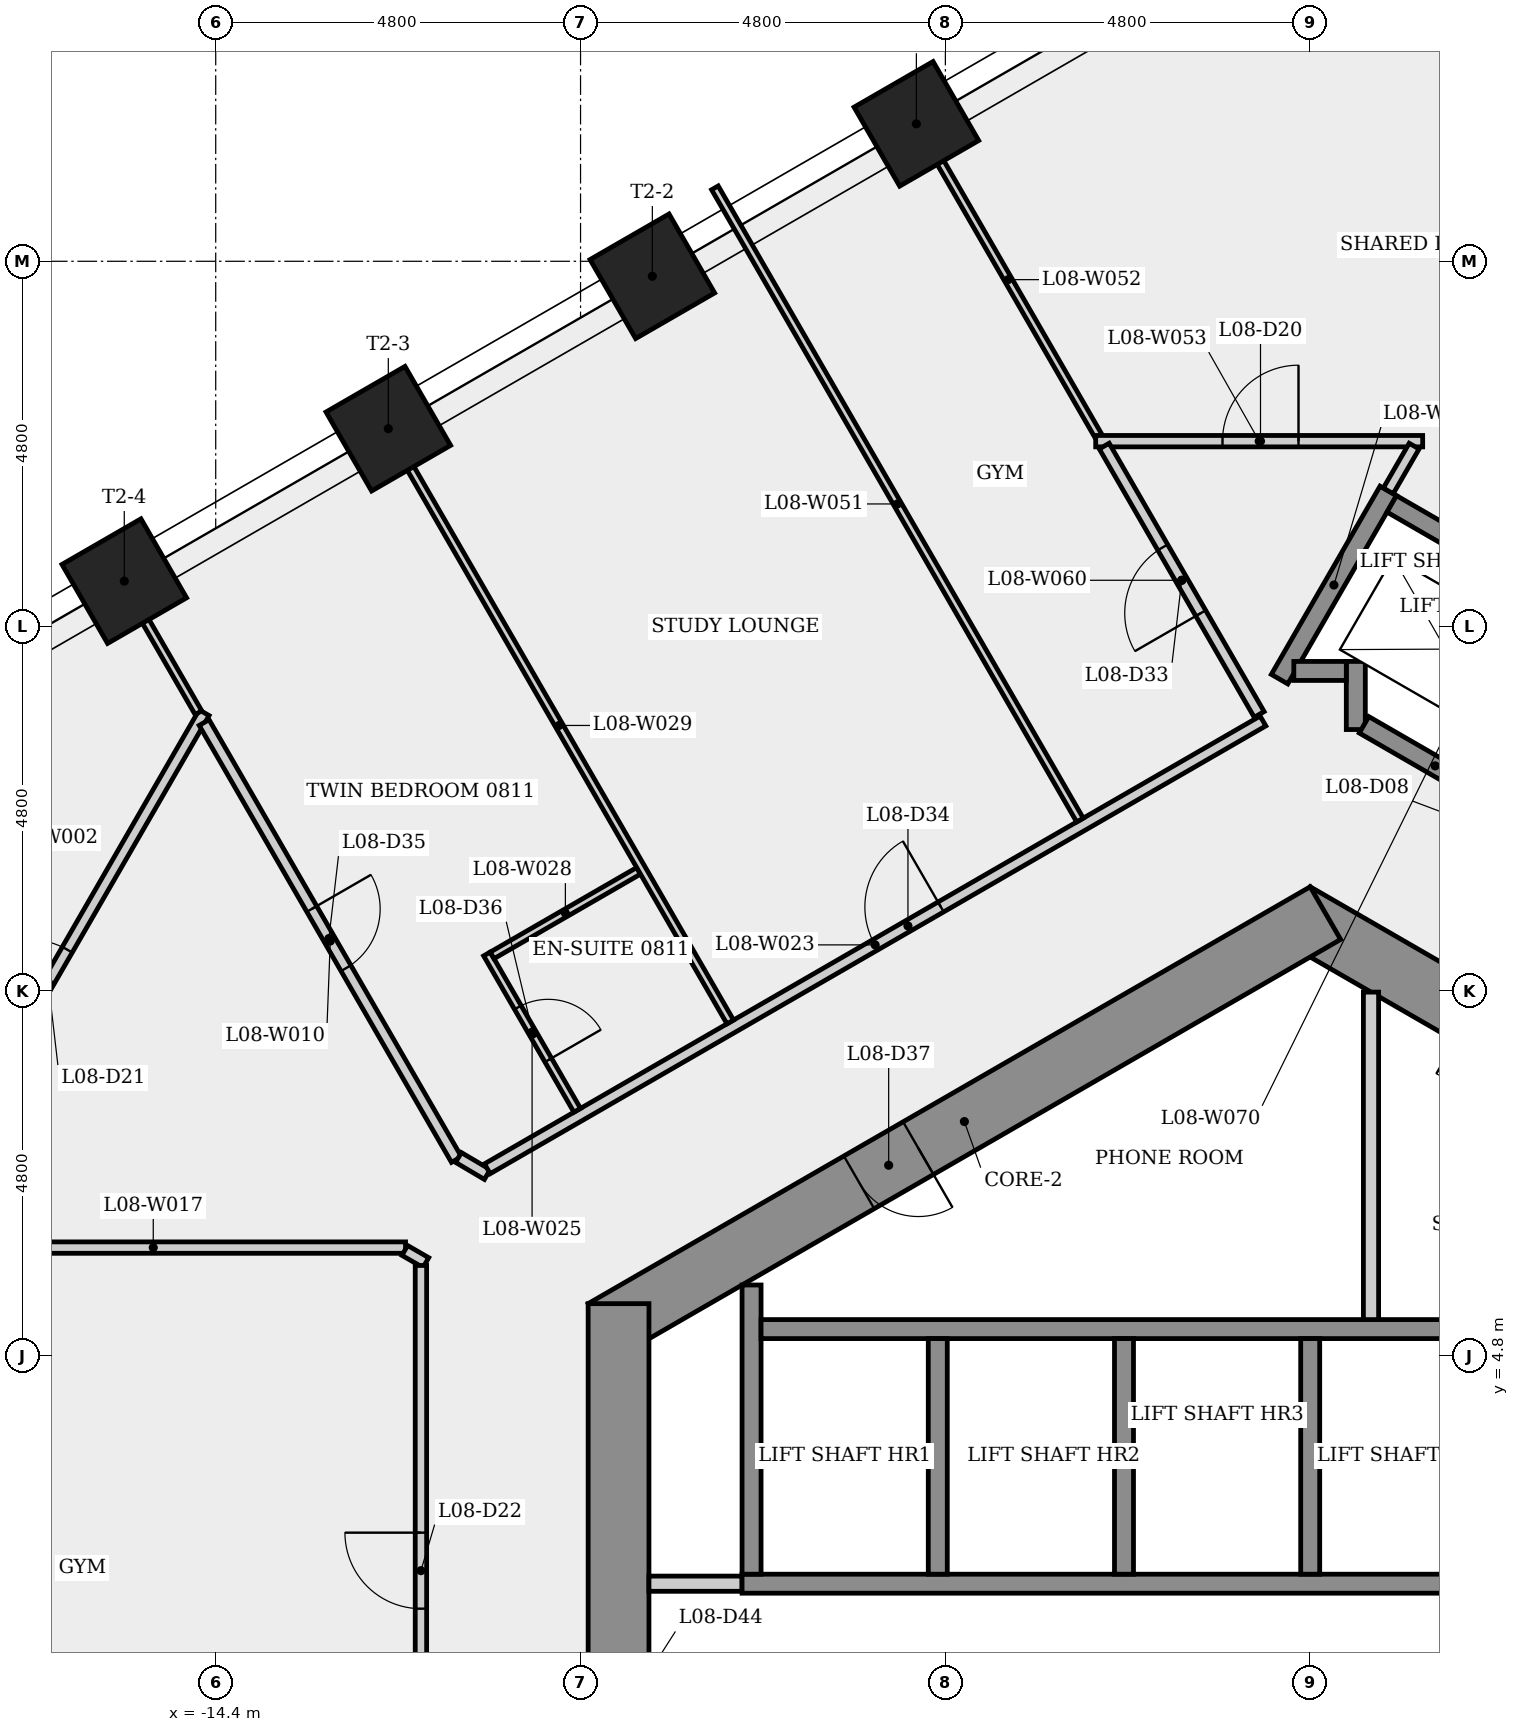
"""IFC4 building model, lengths in metres.
Left out: names, types, materials, properties, quantities, classifications, styles, units other than length and angle.
Written with IfcOpenShell. Run it as: python <this file> out.ifc"""

import sys

from ifc_helpers import new_model, si_unit, direction, frame, frame_2d, origin, origin_2d, place, context, subcontext, project, spatial, rectangle, extrude, element, fill, save


model = new_model("IFC4")
c1 = context("Model", 3, precision=1e-05, world=origin(), true_north=direction((0.0, 1.0)))
c2 = subcontext(c1, "Body", "Model", "MODEL_VIEW")
j1 = project(units=[si_unit("LENGTHUNIT", "METRE"), si_unit("PLANEANGLEUNIT", "RADIAN")], contexts=[c1])
p1 = place(None, origin())
s1 = spatial("IfcSite", under=j1, at=p1, CompositionType="ELEMENT")
p2 = place(p1, origin())
s2 = spatial("IfcBuilding", under=s1, at=p2, CompositionType="ELEMENT")
p3 = place(p2, frame((0.0, 0.0, 35.7)))
s3 = spatial("IfcBuildingStorey", under=s2, at=p3, CompositionType="ELEMENT", Elevation=35.7)
p4 = place(p3, frame((9.3, 5.138, 0.0), z_axis=(0.0, 0.0, 1.0), x_axis=(-0.866023993627, 0.500002442456, 0.0)))
e1 = element("IfcWall", 1, at=p4, inside=s3, PredefinedType="SHEAR", context=c2, shape_type="SweptSolid", body=[
    extrude(rectangle(XDim=10.97, YDim=0.8, at=frame_2d((5.485, 0.0))), origin(), (0.0, 0.0, 1.0), 3.4),
])
p5 = place(p4, frame((7.403, 0.0, 0.0)))
e2 = element("IfcOpeningElement", 2, at=p5, cuts=e1, PredefinedType="OPENING", context=c2, shape_type="SweptSolid", body=[
    extrude(rectangle(XDim=0.9, YDim=2.1, at=frame_2d((0.45, 1.05))), frame((0.0, 0.41, 0.0), z_axis=(0.0, -1.0, 0.0), x_axis=(1.0, 0.0, 0.0)), (0.0, 0.0, 1.0), 0.82),
])
p6 = place(p4, frame((0.78, 0.0, 0.0)))
e3 = element("IfcOpeningElement", 3, at=p6, cuts=e1, PredefinedType="OPENING", context=c2, shape_type="SweptSolid", body=[
    extrude(rectangle(XDim=0.9, YDim=2.1, at=frame_2d((0.45, 1.05))), frame((0.0, 0.41, 0.0), z_axis=(0.0, -1.0, 0.0), x_axis=(1.0, 0.0, 0.0)), (0.0, 0.0, 1.0), 0.82),
])
p7 = place(p3, frame((0.2, 10.623, 0.0), z_axis=(0.0, 0.0, 1.0), x_axis=(-0.866023993627, -0.500002442456, 0.0)))
e4 = element("IfcWall", 4, at=p7, inside=s3, PredefinedType="SHEAR", context=c2, shape_type="SweptSolid", body=[
    extrude(rectangle(XDim=10.97, YDim=0.8, at=frame_2d((5.485, 0.0))), origin(), (0.0, 0.0, 1.0), 3.4),
])
p8 = place(p7, frame((6.185, 0.0, 0.0)))
e5 = element("IfcOpeningElement", 5, at=p8, cuts=e4, PredefinedType="OPENING", context=c2, shape_type="SweptSolid", body=[
    extrude(rectangle(XDim=0.9, YDim=2.1, at=frame_2d((0.45, 1.05))), frame((0.0, 0.41, 0.0), z_axis=(0.0, -1.0, 0.0), x_axis=(1.0, 0.0, 0.0)), (0.0, 0.0, 1.0), 0.82),
])
p9 = place(p3, frame((-9.1, 5.485, 0.0), z_axis=(0.0, 0.0, 1.0), x_axis=(0.0, -1.0, 0.0)))
e6 = element("IfcWall", 6, at=p9, inside=s3, PredefinedType="SHEAR", context=c2, shape_type="SweptSolid", body=[
    extrude(rectangle(XDim=10.97, YDim=0.8, at=frame_2d((5.485, 0.0))), origin(), (0.0, 0.0, 1.0), 3.4),
])
p10 = place(p9, frame((4.685, 0.0, 0.0)))
e7 = element("IfcOpeningElement", 7, at=p10, cuts=e6, PredefinedType="OPENING", context=c2, shape_type="SweptSolid", body=[
    extrude(rectangle(XDim=1.6, YDim=2.1, at=frame_2d((0.8, 1.05))), frame((0.0, 0.41, 0.0), z_axis=(0.0, -1.0, 0.0), x_axis=(1.0, 0.0, 0.0)), (0.0, 0.0, 1.0), 0.82),
])
for number, where, z_axis, x_axis in (
    (8, (-5.182, 21.009, 0.0), (0.0, 0.0, 1.0), (-0.5, 0.866, 0.0)),
    (9, (-8.655, 19.003, 0.0), (0.0, 0.0, 1.0), (-0.5, 0.866, 0.0)),
    (10, (-12.129, 16.997, 0.0), (0.0, 0.0, 1.0), (-0.5, 0.866, 0.0)),
    (11, (-15.603, 14.991, 0.0), (0.0, 0.0, 1.0), (-0.5, 0.866, 0.0)),
):
    element("IfcColumn", number, at=place(p3, frame(where, z_axis=z_axis, x_axis=x_axis)), inside=s3, PredefinedType="COLUMN", context=c2, shape_type="SweptSolid", body=[
        extrude(rectangle(XDim=1.2, YDim=1.2, at=origin_2d()), origin(), (0.0, 0.0, 1.0), 3.4),
    ])
p11 = place(p3, frame((-18.653, 6.157, 0.0), z_axis=(0.0, 0.0, 1.0), x_axis=(0.499990428537, 0.866030929801, 0.0)))
e12 = element("IfcWall", 12, at=p11, inside=s3, PredefinedType="PARTITIONING", context=c2, shape_type="SweptSolid", body=[
    extrude(rectangle(XDim=8.202, YDim=0.15, at=frame_2d((4.101, 0.0))), origin(), (0.0, 0.0, 1.0), 3.05),
])
p12 = place(p11, frame((3.601, 0.0, 0.0)))
e13 = element("IfcOpeningElement", 13, at=p12, cuts=e12, PredefinedType="OPENING", context=c2, shape_type="SweptSolid", body=[
    extrude(rectangle(XDim=1.0, YDim=2.1, at=frame_2d((0.5, 1.05))), frame((0.0, 0.085, 0.0), z_axis=(0.0, -1.0, 0.0), x_axis=(1.0, 0.0, 0.0)), (0.0, 0.0, 1.0), 0.17),
])
p13 = place(p3, frame((-15.621, 14.981, 0.0), z_axis=(0.0, 0.0, 1.0), x_axis=(0.499984821847, -0.866034166718, 0.0)))
e14 = element("IfcWall", 14, at=p13, inside=s3, PredefinedType="PARTITIONING", context=c2, shape_type="SweptSolid", body=[
    extrude(rectangle(XDim=1.987, YDim=0.1, at=frame_2d((0.993, 0.0))), origin(), (0.0, 0.0, 1.0), 3.05),
])
p14 = place(p3, frame((-14.552, 13.131, 0.0), z_axis=(0.0, 0.0, 1.0), x_axis=(0.500011064058, -0.866019015853, 0.0)))
e15 = element("IfcWall", 15, at=p14, inside=s3, PredefinedType="PARTITIONING", context=c2, shape_type="SweptSolid", body=[
    extrude(rectangle(XDim=6.639, YDim=0.15, at=frame_2d((3.319, 0.0))), origin(), (0.0, 0.0, 1.0), 3.05),
])
p15 = place(p14, frame((2.832, 0.0, 0.0)))
e16 = element("IfcOpeningElement", 16, at=p15, cuts=e15, PredefinedType="OPENING", context=c2, shape_type="SweptSolid", body=[
    extrude(rectangle(XDim=0.9, YDim=2.1, at=frame_2d((0.45, 1.05))), frame((0.0, 0.085, 0.0), z_axis=(0.0, -1.0, 0.0), x_axis=(1.0, 0.0, 0.0)), (0.0, 0.0, 1.0), 0.17),
])
p16 = place(p3, frame((-11.903, 6.222, 0.0), z_axis=(0.0, 0.0, 1.0), x_axis=(-1.0, 0.0, 0.0)))
e17 = element("IfcWall", 17, at=p16, inside=s3, PredefinedType="PARTITIONING", context=c2, shape_type="SweptSolid", body=[
    extrude(rectangle(XDim=6.638, YDim=0.15, at=frame_2d((3.319, 0.0))), origin(), (0.0, 0.0, 1.0), 3.05),
])
p17 = place(p3, frame((-11.635, 6.025, 0.0), z_axis=(0.0, 0.0, 1.0), x_axis=(-0.866172903102, 0.499744436618, 0.0)))
e18 = element("IfcWall", 18, at=p17, inside=s3, PredefinedType="PARTITIONING", context=c2, shape_type="SweptSolid", body=[
    extrude(rectangle(XDim=0.321, YDim=0.15, at=frame_2d((0.16, 0.0))), origin(), (0.0, 0.0, 1.0), 3.05),
])
p18 = place(p3, frame((-11.7, -5.987, 0.0), z_axis=(0.0, 0.0, 1.0), x_axis=(0.0, 1.0, 0.0)))
e19 = element("IfcWall", 19, at=p18, inside=s3, PredefinedType="PARTITIONING", context=c2, shape_type="SweptSolid", body=[
    extrude(rectangle(XDim=11.975, YDim=0.15, at=frame_2d((5.987, 0.0))), origin(), (0.0, 0.0, 1.0), 3.05),
])
p19 = place(p18, frame((7.459, 0.0, 0.0)))
e20 = element("IfcOpeningElement", 20, at=p19, cuts=e19, PredefinedType="OPENING", context=c2, shape_type="SweptSolid", body=[
    extrude(rectangle(XDim=1.0, YDim=2.1, at=frame_2d((0.5, 1.05))), frame((0.0, 0.085, 0.0), z_axis=(0.0, -1.0, 0.0), x_axis=(1.0, 0.0, 0.0)), (0.0, 0.0, 1.0), 0.17),
])
p20 = place(p3, frame((-11.206, 7.408, 0.0), z_axis=(0.0, 0.0, 1.0), x_axis=(0.860849270889, -0.508860032631, 0.0)))
e21 = element("IfcWall", 21, at=p20, inside=s3, PredefinedType="PARTITIONING", context=c2, shape_type="SweptSolid", body=[
    extrude(rectangle(XDim=0.44, YDim=0.15, at=frame_2d((0.22, 0.0))), origin(), (0.0, 0.0, 1.0), 3.05),
])
p21 = place(p3, frame((-10.826, 7.26, 0.0), z_axis=(0.0, 0.0, 1.0), x_axis=(0.866022388473, 0.500005222637, 0.0)))
e22 = element("IfcWall", 22, at=p21, inside=s3, PredefinedType="PARTITIONING", context=c2, shape_type="SweptSolid", body=[
    extrude(rectangle(XDim=11.783, YDim=0.15, at=frame_2d((5.892, 0.0))), origin(), (0.0, 0.0, 1.0), 3.05),
])
p22 = place(p21, frame((5.89, 0.0, 0.0)))
e23 = element("IfcOpeningElement", 23, at=p22, cuts=e22, PredefinedType="OPENING", context=c2, shape_type="SweptSolid", body=[
    extrude(rectangle(XDim=1.0, YDim=2.1, at=frame_2d((0.5, 1.05))), frame((0.0, 0.085, 0.0), z_axis=(0.0, -1.0, 0.0), x_axis=(1.0, 0.0, 0.0)), (0.0, 0.0, 1.0), 0.17),
])
p23 = place(p3, frame((-10.831, 10.086, 0.0), z_axis=(0.0, 0.0, 1.0), x_axis=(0.499986429846, -0.866033238375, 0.0)))
e24 = element("IfcWall", 24, at=p23, inside=s3, PredefinedType="PARTITIONING", context=c2, shape_type="SweptSolid", body=[
    extrude(rectangle(XDim=2.375, YDim=0.1, at=frame_2d((1.188, 0.0))), origin(), (0.0, 0.0, 1.0), 3.05),
])
p24 = place(p23, frame((0.812, 0.0, 0.0)))
e25 = element("IfcOpeningElement", 25, at=p24, cuts=e24, PredefinedType="OPENING", context=c2, shape_type="SweptSolid", body=[
    extrude(rectangle(XDim=0.8, YDim=2.1, at=frame_2d((0.4, 1.05))), frame((0.0, 0.06, 0.0), z_axis=(0.0, -1.0, 0.0), x_axis=(1.0, 0.0, 0.0)), (0.0, 0.0, 1.0), 0.12),
])
p25 = place(p3, frame((-8.836, 11.18, 0.0), z_axis=(0.0, 0.0, 1.0), x_axis=(-0.865999189711, -0.500045401358, 0.0)))
e26 = element("IfcWall", 26, at=p25, inside=s3, PredefinedType="PARTITIONING", context=c2, shape_type="SweptSolid", body=[
    extrude(rectangle(XDim=2.225, YDim=0.1, at=frame_2d((1.112, 0.0))), origin(), (0.0, 0.0, 1.0), 3.05),
])
p26 = place(p3, frame((-12.135, 16.994, 0.0), z_axis=(0.0, 0.0, 1.0), x_axis=(0.499997670926, -0.866026748472, 0.0)))
e27 = element("IfcWall", 27, at=p26, inside=s3, PredefinedType="PARTITIONING", context=c2, shape_type="SweptSolid", body=[
    extrude(rectangle(XDim=9.01, YDim=0.1, at=frame_2d((4.505, 0.0))), origin(), (0.0, 0.0, 1.0), 3.05),
])
p27 = place(p3, frame((-8.7, 1.8, 0.0), z_axis=(0.0, 0.0, 1.0), x_axis=(1.0, 0.0, 0.0)))
e28 = element("IfcWall", 28, at=p27, inside=s3, PredefinedType="PARTITIONING", context=c2, shape_type="SweptSolid", body=[
    extrude(rectangle(XDim=1.225, YDim=0.2, at=frame_2d((0.613, 0.0))), origin(), (0.0, 0.0, 1.0), 3.05),
])
p28 = place(p3, frame((-7.475, 1.8, 0.0), z_axis=(0.0, 0.0, 1.0), x_axis=(1.0, 0.0, 0.0)))
e29 = element("IfcWall", 29, at=p28, inside=s3, PredefinedType="SHEAR", context=c2, shape_type="SweptSolid", body=[
    extrude(rectangle(XDim=14.95, YDim=0.25, at=frame_2d((7.475, 0.0))), origin(), (0.0, 0.0, 1.0), 3.05),
])
p29 = place(p3, frame((-7.35, 1.925, 0.0), z_axis=(0.0, 0.0, 1.0), x_axis=(0.0, 1.0, 0.0)))
e30 = element("IfcWall", 30, at=p29, inside=s3, PredefinedType="SHEAR", context=c2, shape_type="SweptSolid", body=[
    extrude(rectangle(XDim=3.805, YDim=0.25, at=frame_2d((1.903, 0.0))), origin(), (0.0, 0.0, 1.0), 3.05),
])
p30 = place(p3, frame((-7.225, 5.15, 0.0), z_axis=(0.0, 0.0, 1.0), x_axis=(1.0, 0.0, 0.0)))
e31 = element("IfcWall", 31, at=p30, inside=s3, PredefinedType="SHEAR", context=c2, shape_type="SweptSolid", body=[
    extrude(rectangle(XDim=14.7, YDim=0.25, at=frame_2d((7.35, 0.0))), origin(), (0.0, 0.0, 1.0), 3.05),
])
p31 = place(p3, frame((-4.9, 5.025, 0.0), z_axis=(0.0, 0.0, 1.0), x_axis=(0.0, -1.0, 0.0)))
e32 = element("IfcWall", 32, at=p31, inside=s3, PredefinedType="SHEAR", context=c2, shape_type="SweptSolid", body=[
    extrude(rectangle(XDim=3.1, YDim=0.25, at=frame_2d((1.55, 0.0))), origin(), (0.0, 0.0, 1.0), 3.4),
])
p32 = place(p3, frame((-3.029, 11.848, 0.0), z_axis=(0.0, 0.0, 1.0), x_axis=(-0.49998793222, 0.866032371008, 0.0)))
e33 = element("IfcWall", 33, at=p32, inside=s3, PredefinedType="PARTITIONING", context=c2, shape_type="SweptSolid", body=[
    extrude(rectangle(XDim=9.606, YDim=0.1, at=frame_2d((4.803, 0.0))), origin(), (0.0, 0.0, 1.0), 3.05),
])
p33 = place(p3, frame((-2.785, 16.898, 0.0), z_axis=(0.0, 0.0, 1.0), x_axis=(-0.500018554574, 0.866014691031, 0.0)))
e34 = element("IfcWall", 34, at=p33, inside=s3, PredefinedType="PARTITIONING", context=c2, shape_type="SweptSolid", body=[
    extrude(rectangle(XDim=4.758, YDim=0.1, at=frame_2d((2.379, 0.0))), origin(), (0.0, 0.0, 1.0), 3.05),
])
p34 = place(p3, frame((-2.822, 16.833, 0.0), z_axis=(0.0, 0.0, 1.0), x_axis=(1.0, 0.0, 0.0)))
e35 = element("IfcWall", 35, at=p34, inside=s3, PredefinedType="PARTITIONING", context=c2, shape_type="SweptSolid", body=[
    extrude(rectangle(XDim=4.302, YDim=0.15, at=frame_2d((2.151, 0.0))), origin(), (0.0, 0.0, 1.0), 3.05),
])
p35 = place(p34, frame((1.668, 0.0, 0.0)))
e36 = element("IfcOpeningElement", 36, at=p35, cuts=e35, PredefinedType="OPENING", context=c2, shape_type="SweptSolid", body=[
    extrude(rectangle(XDim=1.0, YDim=2.1, at=frame_2d((0.5, 1.05))), frame((0.0, 0.085, 0.0), z_axis=(0.0, -1.0, 0.0), x_axis=(1.0, 0.0, 0.0)), (0.0, 0.0, 1.0), 0.17),
])
p36 = place(p3, frame((-2.45, 5.025, 0.0), z_axis=(0.0, 0.0, 1.0), x_axis=(0.0, -1.0, 0.0)))
e37 = element("IfcWall", 37, at=p36, inside=s3, PredefinedType="SHEAR", context=c2, shape_type="SweptSolid", body=[
    extrude(rectangle(XDim=3.1, YDim=0.25, at=frame_2d((1.55, 0.0))), origin(), (0.0, 0.0, 1.0), 3.4),
])
p37 = place(p3, frame((-0.671, 13.237, 0.0), z_axis=(0.0, 0.0, 1.0), x_axis=(-0.499990257196, 0.866031028722, 0.0)))
e38 = element("IfcWall", 38, at=p37, inside=s3, PredefinedType="PARTITIONING", context=c2, shape_type="SweptSolid", body=[
    extrude(rectangle(XDim=4.077, YDim=0.15, at=frame_2d((2.039, 0.0))), origin(), (0.0, 0.0, 1.0), 3.05),
])
p38 = place(p37, frame((1.539, 0.0, 0.0)))
e39 = element("IfcOpeningElement", 39, at=p38, cuts=e38, PredefinedType="OPENING", context=c2, shape_type="SweptSolid", body=[
    extrude(rectangle(XDim=1.0, YDim=2.1, at=frame_2d((0.5, 1.05))), frame((0.0, 0.085, 0.0), z_axis=(0.0, -1.0, 0.0), x_axis=(1.0, 0.0, 0.0)), (0.0, 0.0, 1.0), 0.17),
])
p39 = place(p3, frame((-0.403, 13.702, 0.0), z_axis=(0.0, 0.0, 1.0), x_axis=(0.499976111731, 0.866039195244, 0.0)))
e40 = element("IfcWall", 40, at=p39, inside=s3, PredefinedType="SHEAR", context=c2, shape_type="SweptSolid", body=[
    extrude(rectangle(XDim=2.861, YDim=0.25, at=frame_2d((1.43, 0.0))), origin(), (0.0, 0.0, 1.0), 3.05),
])
p40 = place(p3, frame((0.0, 5.025, 0.0), z_axis=(0.0, 0.0, 1.0), x_axis=(0.0, -1.0, 0.0)))
e41 = element("IfcWall", 41, at=p40, inside=s3, PredefinedType="SHEAR", context=c2, shape_type="SweptSolid", body=[
    extrude(rectangle(XDim=3.1, YDim=0.25, at=frame_2d((1.55, 0.0))), origin(), (0.0, 0.0, 1.0), 3.4),
])
p41 = place(p3, frame((0.6, 13.039, 0.0), z_axis=(0.0, 0.0, 1.0), x_axis=(0.0, 1.0, 0.0)))
e42 = element("IfcWall", 42, at=p41, inside=s3, PredefinedType="SHEAR", context=c2, shape_type="SweptSolid", body=[
    extrude(rectangle(XDim=0.896, YDim=0.25, at=frame_2d((0.448, 0.0))), origin(), (0.0, 0.0, 1.0), 3.05),
])
p42 = place(p3, frame((0.475, 13.81, 0.0), z_axis=(0.0, 0.0, 1.0), x_axis=(-1.0, 0.0, 0.0)))
e43 = element("IfcWall", 43, at=p42, inside=s3, PredefinedType="SHEAR", context=c2, shape_type="SweptSolid", body=[
    extrude(rectangle(XDim=0.691, YDim=0.25, at=frame_2d((0.345, 0.0))), origin(), (0.0, 0.0, 1.0), 3.4),
])
p43 = place(p3, frame((0.8, 9.584, 0.0), z_axis=(0.0, 0.0, 1.0), x_axis=(0.0, -1.0, 0.0)))
e44 = element("IfcWall", 44, at=p43, inside=s3, PredefinedType="PARTITIONING", context=c2, shape_type="SweptSolid", body=[
    extrude(rectangle(XDim=4.309, YDim=0.2, at=frame_2d((2.155, 0.0))), origin(), (0.0, 0.0, 1.0), 3.05),
])
p44 = place(p3, frame((1.073, 16.008, 0.0), z_axis=(0.0, 0.0, 1.0), x_axis=(0.866040211805, -0.499974350878, 0.0)))
e45 = element("IfcWall", 45, at=p44, inside=s3, PredefinedType="SHEAR", context=c2, shape_type="SweptSolid", body=[
    extrude(rectangle(XDim=3.3, YDim=0.25, at=frame_2d((1.65, 0.0))), origin(), (0.0, 0.0, 1.0), 3.05),
])
p45 = place(p3, frame((1.367, 16.768, 0.0), z_axis=(0.0, 0.0, 1.0), x_axis=(-0.499805281321, -0.866137795483, 0.0)))
e46 = element("IfcWall", 46, at=p45, inside=s3, PredefinedType="PARTITIONING", context=c2, shape_type="SweptSolid", body=[
    extrude(rectangle(XDim=0.68, YDim=0.15, at=frame_2d((0.34, 0.0))), origin(), (0.0, 0.0, 1.0), 3.05),
])
p46 = place(p3, frame((2.581, 12.02, 0.0), z_axis=(0.0, 0.0, 1.0), x_axis=(-0.86603892542, 0.499976579108, 0.0)))
e47 = element("IfcWall", 47, at=p46, inside=s3, PredefinedType="SHEAR", context=c2, shape_type="SweptSolid", body=[
    extrude(rectangle(XDim=2.162, YDim=0.25, at=frame_2d((1.081, 0.0))), origin(), (0.0, 0.0, 1.0), 3.05),
])
p47 = place(p35, origin())
e48 = element("IfcDoor", 48, at=p47, inside=s3, OperationType="SINGLE_SWING_RIGHT", PredefinedType="DOOR", context=c2, shape_type="SweptSolid", body=[
    extrude(rectangle(XDim=1.0, YDim=2.1, at=frame_2d((0.5, 1.05))), frame((0.0, 0.025, 0.0), z_axis=(0.0, -1.0, 0.0), x_axis=(1.0, 0.0, 0.0)), (0.0, 0.0, 1.0), 0.05),
])
fill(e36, e48)
p48 = place(p12, origin())
e49 = element("IfcDoor", 49, at=p48, inside=s3, OperationType="SINGLE_SWING_LEFT", PredefinedType="DOOR", context=c2, shape_type="SweptSolid", body=[
    extrude(rectangle(XDim=1.0, YDim=2.1, at=frame_2d((0.5, 1.05))), frame((0.0, 0.025, 0.0), z_axis=(0.0, -1.0, 0.0), x_axis=(1.0, 0.0, 0.0)), (0.0, 0.0, 1.0), 0.05),
])
fill(e13, e49)
p49 = place(p19, origin())
e50 = element("IfcDoor", 50, at=p49, inside=s3, OperationType="SINGLE_SWING_RIGHT", PredefinedType="DOOR", context=c2, shape_type="SweptSolid", body=[
    extrude(rectangle(XDim=1.0, YDim=2.1, at=frame_2d((0.5, 1.05))), frame((0.0, 0.025, 0.0), z_axis=(0.0, -1.0, 0.0), x_axis=(1.0, 0.0, 0.0)), (0.0, 0.0, 1.0), 0.05),
])
fill(e20, e50)
p50 = place(p38, origin())
e51 = element("IfcDoor", 51, at=p50, inside=s3, OperationType="SINGLE_SWING_LEFT", PredefinedType="DOOR", context=c2, shape_type="SweptSolid", body=[
    extrude(rectangle(XDim=1.0, YDim=2.1, at=frame_2d((0.5, 1.05))), frame((0.0, 0.025, 0.0), z_axis=(0.0, -1.0, 0.0), x_axis=(1.0, 0.0, 0.0)), (0.0, 0.0, 1.0), 0.05),
])
fill(e39, e51)
p51 = place(p22, origin())
e52 = element("IfcDoor", 52, at=p51, inside=s3, OperationType="SINGLE_SWING_RIGHT", PredefinedType="DOOR", context=c2, shape_type="SweptSolid", body=[
    extrude(rectangle(XDim=1.0, YDim=2.1, at=frame_2d((0.5, 1.05))), frame((0.0, 0.025, 0.0), z_axis=(0.0, -1.0, 0.0), x_axis=(1.0, 0.0, 0.0)), (0.0, 0.0, 1.0), 0.05),
])
fill(e23, e52)
p52 = place(p15, origin())
e53 = element("IfcDoor", 53, at=p52, inside=s3, OperationType="SINGLE_SWING_LEFT", PredefinedType="DOOR", context=c2, shape_type="SweptSolid", body=[
    extrude(rectangle(XDim=0.9, YDim=2.1, at=frame_2d((0.45, 1.05))), frame((0.0, 0.025, 0.0), z_axis=(0.0, -1.0, 0.0), x_axis=(1.0, 0.0, 0.0)), (0.0, 0.0, 1.0), 0.05),
])
fill(e16, e53)
p53 = place(p24, origin())
e54 = element("IfcDoor", 54, at=p53, inside=s3, OperationType="SINGLE_SWING_RIGHT", PredefinedType="DOOR", context=c2, shape_type="SweptSolid", body=[
    extrude(rectangle(XDim=0.8, YDim=2.1, at=frame_2d((0.4, 1.05))), frame((0.0, 0.025, 0.0), z_axis=(0.0, -1.0, 0.0), x_axis=(1.0, 0.0, 0.0)), (0.0, 0.0, 1.0), 0.05),
])
fill(e25, e54)
p54 = place(p8, origin())
e55 = element("IfcDoor", 55, at=p54, inside=s3, OperationType="SINGLE_SWING_LEFT", PredefinedType="DOOR", context=c2, shape_type="SweptSolid", body=[
    extrude(rectangle(XDim=0.9, YDim=2.1, at=frame_2d((0.45, 1.05))), frame((0.0, 0.025, 0.0), z_axis=(0.0, -1.0, 0.0), x_axis=(1.0, 0.0, 0.0)), (0.0, 0.0, 1.0), 0.05),
])
fill(e5, e55)
save(model, sys.argv[1])
